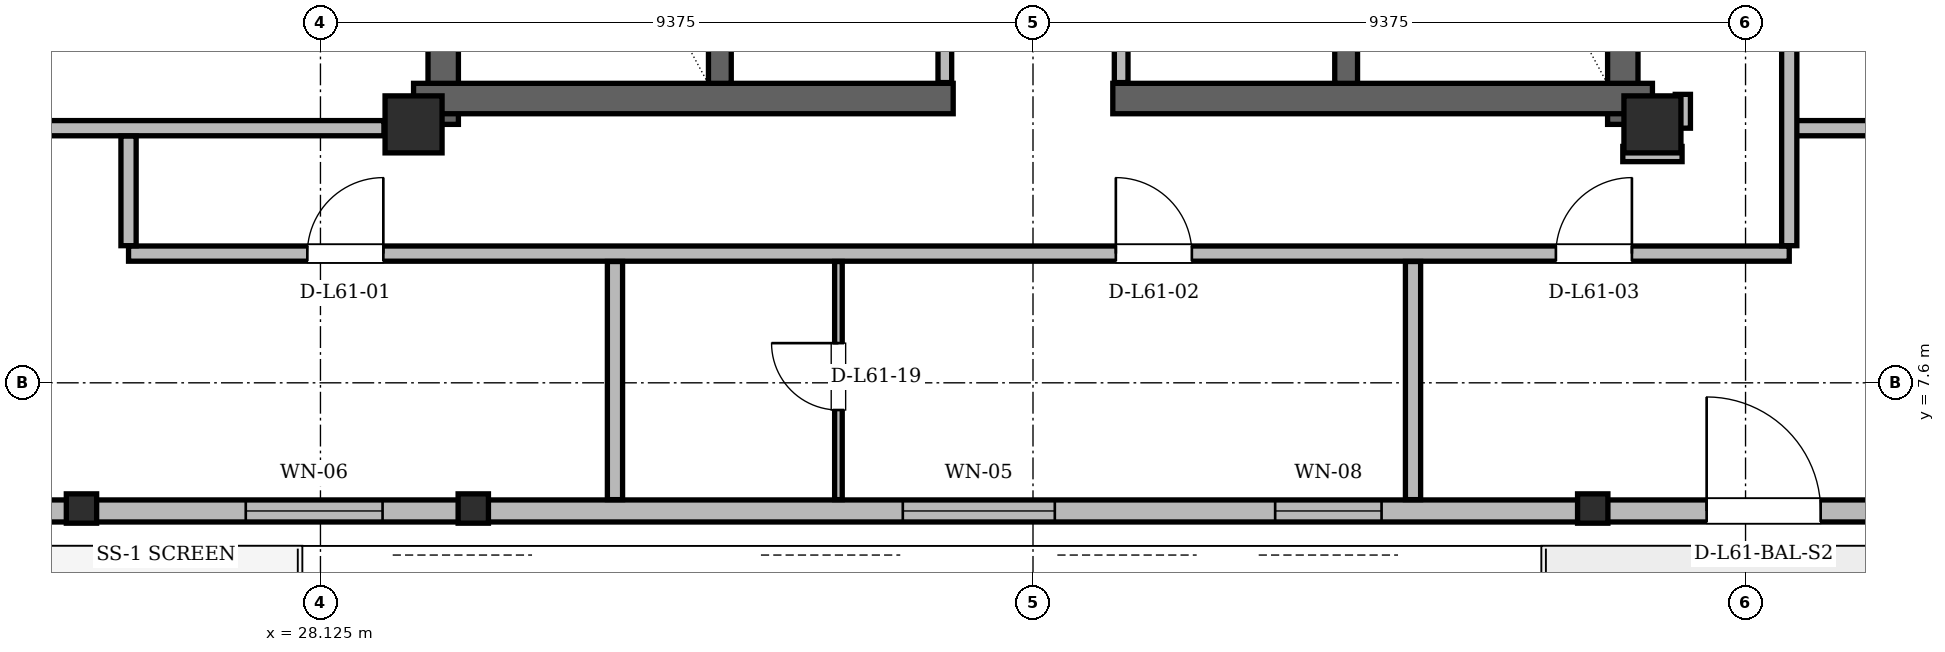
"""IFC4 building model, lengths in metres.
Left out: names, types, materials, properties, quantities, classifications, styles, units other than length and angle.
Written with IfcOpenShell. Run it as: python <this file> out.ifc"""

import sys

from ifc_helpers import new_model, si_unit, direction, frame, frame_2d, origin, origin_2d, place, context, subcontext, project, spatial, rectangle, hollow_rectangle, i_section, extrude, element, fill, save


model = new_model("IFC4")
c1 = context("Model", 3, precision=1e-05, world=origin(), true_north=direction((0.0, 1.0)))
c2 = subcontext(c1, "Body", "Model", "MODEL_VIEW")
j1 = project(units=[si_unit("LENGTHUNIT", "METRE"), si_unit("PLANEANGLEUNIT", "RADIAN")], contexts=[c1])
p1 = place(None, origin())
s1 = spatial("IfcSite", under=j1, at=p1, CompositionType="ELEMENT")
p2 = place(p1, origin())
s2 = spatial("IfcBuilding", under=s1, at=p2, CompositionType="ELEMENT")
p3 = place(p2, frame((0.0, 0.0, 230.7)))
s3 = spatial("IfcBuildingStorey", under=s2, at=p3, CompositionType="ELEMENT", Elevation=230.7)
for number, where, z_axis, x_axis in (
    (1, (29.35, 11.0, 0.0), (0.0, 0.0, 1.0), (1.0, 0.0, 0.0)),
    (2, (45.65, 11.0, 0.0), (0.0, 0.0, 1.0), (1.0, 0.0, 0.0)),
):
    element("IfcColumn", number, at=place(p3, frame(where, z_axis=z_axis, x_axis=x_axis)), inside=s3, PredefinedType="COLUMN", context=c2, shape_type="SweptSolid", body=[
        extrude(hollow_rectangle(XDim=0.75, YDim=0.75, WallThickness=0.06, at=origin_2d()), origin(), (0.0, 0.0, 1.0), 3.6),
    ])
p4 = place(p3, frame((24.99, 5.914, 0.005), z_axis=(-0.004962424838, 0.017946303524, 0.999826637237), x_axis=(-0.963831076081, -0.266513896037, 0.0)))
e3 = element("IfcColumn", 3, at=p4, inside=s3, PredefinedType="COLUMN", context=c2, shape_type="SweptSolid", body=[
    extrude(i_section(OverallWidth=0.399, OverallDepth=0.386, WebThickness=0.021, FlangeThickness=0.033, at=origin_2d()), origin(), (0.0, 0.0, 1.0), 3.592),
])
for number, where, z_axis, x_axis in (
    (4, (30.141, 5.914, 0.005), (-0.003, 0.018, 1.0), (-0.986, -0.164, 0.0)),
    (5, (44.859, 5.914, 0.005), (0.003, 0.018, 1.0), (-0.986, 0.164, 0.0)),
):
    element("IfcColumn", number, at=place(p3, frame(where, z_axis=z_axis, x_axis=x_axis)), inside=s3, PredefinedType="COLUMN", context=c2, shape_type="SweptSolid", body=[
        extrude(i_section(OverallWidth=0.399, OverallDepth=0.386, WebThickness=0.021, FlangeThickness=0.033, at=origin_2d()), origin(), (0.0, 0.0, 1.0), 3.591),
    ])
for number, where, z_axis, x_axis in (
    (6, (29.74, 11.0, 0.0), (0.0, 0.0, 1.0), (0.0, 1.0, 0.0)),
    (7, (45.26, 11.0, 0.0), (0.0, 0.0, 1.0), (0.0, 1.0, 0.0)),
):
    element("IfcWall", number, at=place(p3, frame(where, z_axis=z_axis, x_axis=x_axis)), inside=s3, PredefinedType="SHEAR", context=c2, shape_type="SweptSolid", body=[
        extrude(rectangle(XDim=13.3, YDim=0.4, at=frame_2d((6.65, 0.0))), origin(), (0.0, 0.0, 1.0), 3.38),
    ])
for number, where, z_axis, x_axis in (
    (8, (29.35, 11.34, 0.0), (0.0, 0.0, 1.0), (1.0, 0.0, 0.0)),
    (9, (38.55, 11.34, 0.0), (0.0, 0.0, 1.0), (1.0, 0.0, 0.0)),
):
    element("IfcWall", number, at=place(p3, frame(where, z_axis=z_axis, x_axis=x_axis)), inside=s3, PredefinedType="SHEAR", context=c2, shape_type="SweptSolid", body=[
        extrude(rectangle(XDim=7.1, YDim=0.4, at=frame_2d((3.55, 0.0))), origin(), (0.0, 0.0, 1.0), 3.38),
    ])
for number, where, z_axis, x_axis in (
    (10, (33.38, 11.54, 0.0), (0.0, 0.0, 1.0), (0.0, 1.0, 0.0)),
    (11, (41.62, 11.54, 0.0), (0.0, 0.0, 1.0), (0.0, 1.0, 0.0)),
):
    element("IfcWall", number, at=place(p3, frame(where, z_axis=z_axis, x_axis=x_axis)), inside=s3, PredefinedType="SHEAR", context=c2, shape_type="SweptSolid", body=[
        extrude(rectangle(XDim=7.62, YDim=0.3, at=frame_2d((3.81, 0.0))), origin(), (0.0, 0.0, 1.0), 3.38),
    ])
p5 = place(p3, frame((19.102, 5.914, 0.0), z_axis=(0.0, 0.0, 1.0), x_axis=(1.0, 0.0, 0.0)))
e12 = element("IfcWall", 12, at=p5, inside=s3, PredefinedType="SOLIDWALL", context=c2, shape_type="SweptSolid", body=[
    extrude(rectangle(XDim=36.795, YDim=0.29, at=frame_2d((18.398, 0.0))), origin(), (0.0, 0.0, 1.0), 2.677),
])
p6 = place(p5, frame((3.639, 0.0, 0.0)))
e13 = element("IfcOpeningElement", 13, at=p6, cuts=e12, PredefinedType="OPENING", context=c2, shape_type="SweptSolid", body=[
    extrude(rectangle(XDim=1.5, YDim=2.2, at=frame_2d((0.75, 1.1))), frame((0.0, 0.145, 0.0), z_axis=(0.0, -1.0, 0.0), x_axis=(1.0, 0.0, 0.0)), (0.0, 0.0, 1.0), 0.29),
])
p7 = place(p5, frame((27.261, 0.0, 0.0)))
e14 = element("IfcOpeningElement", 14, at=p7, cuts=e12, PredefinedType="OPENING", context=c2, shape_type="SweptSolid", body=[
    extrude(rectangle(XDim=1.5, YDim=2.2, at=frame_2d((0.75, 1.1))), frame((0.0, 0.145, 0.0), z_axis=(0.0, -1.0, 0.0), x_axis=(1.0, 0.0, 0.0)), (0.0, 0.0, 1.0), 0.29),
])
p8 = place(p5, frame((8.04, 0.0, 0.85)))
e15 = element("IfcOpeningElement", 15, at=p8, cuts=e12, PredefinedType="OPENING", context=c2, shape_type="SweptSolid", body=[
    extrude(rectangle(XDim=1.8, YDim=1.717, at=frame_2d((0.9, 0.858))), frame((0.0, 0.145, 0.0), z_axis=(0.0, -1.0, 0.0), x_axis=(1.0, 0.0, 0.0)), (0.0, 0.0, 1.0), 0.29),
])
p9 = place(p5, frame((16.685, 0.0, 0.85)))
e16 = element("IfcOpeningElement", 16, at=p9, cuts=e12, PredefinedType="OPENING", context=c2, shape_type="SweptSolid", body=[
    extrude(rectangle(XDim=2.0, YDim=1.717, at=frame_2d((1.0, 0.858))), frame((0.0, 0.145, 0.0), z_axis=(0.0, -1.0, 0.0), x_axis=(1.0, 0.0, 0.0)), (0.0, 0.0, 1.0), 0.29),
])
p10 = place(p5, frame((21.584, 0.0, 0.85)))
e17 = element("IfcOpeningElement", 17, at=p10, cuts=e12, PredefinedType="OPENING", context=c2, shape_type="SweptSolid", body=[
    extrude(rectangle(XDim=1.4, YDim=1.6, at=frame_2d((0.7, 0.8))), frame((0.0, 0.145, 0.0), z_axis=(0.0, -1.0, 0.0), x_axis=(1.0, 0.0, 0.0)), (0.0, 0.0, 1.0), 0.29),
])
p11 = place(p5, frame((32.27, 0.0, 0.85)))
e18 = element("IfcOpeningElement", 18, at=p11, cuts=e12, PredefinedType="OPENING", context=c2, shape_type="SweptSolid", body=[
    extrude(rectangle(XDim=1.2, YDim=1.48, at=frame_2d((0.6, 0.74))), frame((0.0, 0.145, 0.0), z_axis=(0.0, -1.0, 0.0), x_axis=(1.0, 0.0, 0.0)), (0.0, 0.0, 1.0), 0.29),
])
p12 = place(p3, frame((58.984, 11.26, 0.0), z_axis=(0.0, 0.0, 1.0), x_axis=(-0.50000331183, 0.86602349169, 0.0)))
e19 = element("IfcWall", 19, at=p12, inside=s3, PredefinedType="SOLIDWALL", context=c2, shape_type="SweptSolid", body=[
    extrude(rectangle(XDim=36.795, YDim=0.29, at=frame_2d((18.397, 0.0))), origin(), (0.0, 0.0, 1.0), 2.677),
])
p13 = place(p12, frame((3.219, 0.0, 0.0)))
e20 = element("IfcOpeningElement", 20, at=p13, cuts=e19, PredefinedType="OPENING", context=c2, shape_type="SweptSolid", body=[
    extrude(rectangle(XDim=1.5, YDim=2.2, at=frame_2d((0.75, 1.1))), frame((0.0, 0.145, 0.0), z_axis=(0.0, -1.0, 0.0), x_axis=(1.0, 0.0, 0.0)), (0.0, 0.0, 1.0), 0.29),
])
p14 = place(p12, frame((27.151, 0.0, 0.0)))
e21 = element("IfcOpeningElement", 21, at=p14, cuts=e19, PredefinedType="OPENING", context=c2, shape_type="SweptSolid", body=[
    extrude(rectangle(XDim=1.3, YDim=2.2, at=frame_2d((0.65, 1.1))), frame((0.0, 0.145, 0.0), z_axis=(0.0, -1.0, 0.0), x_axis=(1.0, 0.0, 0.0)), (0.0, 0.0, 1.0), 0.29),
])
p15 = place(p12, frame((1.169, 0.0, 0.85)))
e22 = element("IfcOpeningElement", 22, at=p15, cuts=e19, PredefinedType="OPENING", context=c2, shape_type="SweptSolid", body=[
    extrude(rectangle(XDim=1.2, YDim=1.48, at=frame_2d((0.6, 0.74))), frame((0.0, 0.145, 0.0), z_axis=(0.0, -1.0, 0.0), x_axis=(1.0, 0.0, 0.0)), (0.0, 0.0, 1.0), 0.29),
])
p16 = place(p12, frame((7.888, 0.0, 0.85)))
e23 = element("IfcOpeningElement", 23, at=p16, cuts=e19, PredefinedType="OPENING", context=c2, shape_type="SweptSolid", body=[
    extrude(rectangle(XDim=1.2, YDim=1.48, at=frame_2d((0.6, 0.74))), frame((0.0, 0.145, 0.0), z_axis=(0.0, -1.0, 0.0), x_axis=(1.0, 0.0, 0.0)), (0.0, 0.0, 1.0), 0.29),
])
p17 = place(p12, frame((32.464, 0.0, 0.85)))
e24 = element("IfcOpeningElement", 24, at=p17, cuts=e19, PredefinedType="OPENING", context=c2, shape_type="SweptSolid", body=[
    extrude(rectangle(XDim=1.2, YDim=1.48, at=frame_2d((0.6, 0.74))), frame((0.0, 0.145, 0.0), z_axis=(0.0, -1.0, 0.0), x_axis=(1.0, 0.0, 0.0)), (0.0, 0.0, 1.0), 0.29),
])
p18 = place(p12, frame((16.904, 0.0, 0.85)))
e25 = element("IfcOpeningElement", 25, at=p18, cuts=e19, PredefinedType="OPENING", context=c2, shape_type="SweptSolid", body=[
    extrude(rectangle(XDim=2.0, YDim=1.717, at=frame_2d((1.0, 0.858))), frame((0.0, 0.145, 0.0), z_axis=(0.0, -1.0, 0.0), x_axis=(1.0, 0.0, 0.0)), (0.0, 0.0, 1.0), 0.29),
])
p19 = place(p12, frame((23.036, 0.0, 0.85)))
e26 = element("IfcOpeningElement", 26, at=p19, cuts=e19, PredefinedType="OPENING", context=c2, shape_type="SweptSolid", body=[
    extrude(rectangle(XDim=1.4, YDim=1.6, at=frame_2d((0.7, 0.8))), frame((0.0, 0.145, 0.0), z_axis=(0.0, -1.0, 0.0), x_axis=(1.0, 0.0, 0.0)), (0.0, 0.0, 1.0), 0.29),
])
p20 = place(p3, frame((34.414, 43.126, 0.0), z_axis=(0.0, 0.0, 1.0), x_axis=(-0.50000331183, -0.86602349169, 0.0)))
e27 = element("IfcWall", 27, at=p20, inside=s3, PredefinedType="SOLIDWALL", context=c2, shape_type="SweptSolid", body=[
    extrude(rectangle(XDim=36.795, YDim=0.29, at=frame_2d((18.397, 0.0))), origin(), (0.0, 0.0, 1.0), 2.677),
])
p21 = place(p20, frame((3.529, 0.0, 0.0)))
e28 = element("IfcOpeningElement", 28, at=p21, cuts=e27, PredefinedType="OPENING", context=c2, shape_type="SweptSolid", body=[
    extrude(rectangle(XDim=1.3, YDim=2.2, at=frame_2d((0.65, 1.1))), frame((0.0, 0.145, 0.0), z_axis=(0.0, -1.0, 0.0), x_axis=(1.0, 0.0, 0.0)), (0.0, 0.0, 1.0), 0.29),
])
p22 = place(p20, frame((27.261, 0.0, 0.0)))
e29 = element("IfcOpeningElement", 29, at=p22, cuts=e27, PredefinedType="OPENING", context=c2, shape_type="SweptSolid", body=[
    extrude(rectangle(XDim=1.5, YDim=2.2, at=frame_2d((0.75, 1.1))), frame((0.0, 0.145, 0.0), z_axis=(0.0, -1.0, 0.0), x_axis=(1.0, 0.0, 0.0)), (0.0, 0.0, 1.0), 0.29),
])
p23 = place(p20, frame((22.271, 0.0, 0.85)))
e30 = element("IfcOpeningElement", 30, at=p23, cuts=e27, PredefinedType="OPENING", context=c2, shape_type="SweptSolid", body=[
    extrude(rectangle(XDim=2.4, YDim=1.717, at=frame_2d((1.2, 0.858))), frame((0.0, 0.145, 0.0), z_axis=(0.0, -1.0, 0.0), x_axis=(1.0, 0.0, 0.0)), (0.0, 0.0, 1.0), 0.29),
])
p24 = place(p20, frame((33.406, 0.0, 0.85)))
e31 = element("IfcOpeningElement", 31, at=p24, cuts=e27, PredefinedType="OPENING", context=c2, shape_type="SweptSolid", body=[
    extrude(rectangle(XDim=2.2, YDim=1.717, at=frame_2d((1.1, 0.858))), frame((0.0, 0.145, 0.0), z_axis=(0.0, -1.0, 0.0), x_axis=(1.0, 0.0, 0.0)), (0.0, 0.0, 1.0), 0.29),
])
p25 = place(p20, frame((11.662, 0.0, 0.85)))
e32 = element("IfcOpeningElement", 32, at=p25, cuts=e27, PredefinedType="OPENING", context=c2, shape_type="SweptSolid", body=[
    extrude(rectangle(XDim=1.2, YDim=1.48, at=frame_2d((0.6, 0.74))), frame((0.0, 0.145, 0.0), z_axis=(0.0, -1.0, 0.0), x_axis=(1.0, 0.0, 0.0)), (0.0, 0.0, 1.0), 0.29),
])
p26 = place(p20, frame((16.295, 0.0, 0.85)))
e33 = element("IfcOpeningElement", 33, at=p26, cuts=e27, PredefinedType="OPENING", context=c2, shape_type="SweptSolid", body=[
    extrude(rectangle(XDim=1.8, YDim=1.717, at=frame_2d((0.9, 0.858))), frame((0.0, 0.145, 0.0), z_axis=(0.0, -1.0, 0.0), x_axis=(1.0, 0.0, 0.0)), (0.0, 0.0, 1.0), 0.29),
])
p27 = place(p3, frame((36.34, 11.55, 0.0), z_axis=(0.0, 0.0, 1.0), x_axis=(0.0, 1.0, 0.0)))
e34 = element("IfcWall", 34, at=p27, inside=s3, PredefinedType="PARTITIONING", context=c2, shape_type="SweptSolid", body=[
    extrude(rectangle(XDim=5.55, YDim=0.18, at=frame_2d((2.775, 0.0))), origin(), (0.0, 0.0, 1.0), 3.38),
])
p28 = place(p27, frame((2.85, 0.0, 0.0)))
e35 = element("IfcOpeningElement", 35, at=p28, cuts=e34, PredefinedType="OPENING", context=c2, shape_type="SweptSolid", body=[
    extrude(rectangle(XDim=0.95, YDim=2.1, at=frame_2d((0.475, 1.05))), frame((0.0, 0.09, 0.0), z_axis=(0.0, -1.0, 0.0), x_axis=(1.0, 0.0, 0.0)), (0.0, 0.0, 1.0), 0.18),
])
p29 = place(p3, frame((38.66, 11.55, 0.0), z_axis=(0.0, 0.0, 1.0), x_axis=(0.0, 1.0, 0.0)))
e36 = element("IfcWall", 36, at=p29, inside=s3, PredefinedType="PARTITIONING", context=c2, shape_type="SweptSolid", body=[
    extrude(rectangle(XDim=5.55, YDim=0.18, at=frame_2d((2.775, 0.0))), origin(), (0.0, 0.0, 1.0), 3.38),
])
p30 = place(p29, frame((2.0, 0.0, 0.0)))
e37 = element("IfcOpeningElement", 37, at=p30, cuts=e36, PredefinedType="OPENING", context=c2, shape_type="SweptSolid", body=[
    extrude(rectangle(XDim=0.95, YDim=2.1, at=frame_2d((0.475, 1.05))), frame((0.0, 0.09, 0.0), z_axis=(0.0, -1.0, 0.0), x_axis=(1.0, 0.0, 0.0)), (0.0, 0.0, 1.0), 0.18),
])
p31 = place(p3, frame((25.6, 9.3, 0.0), z_axis=(0.0, 0.0, 1.0), x_axis=(1.0, 0.0, 0.0)))
e38 = element("IfcWall", 38, at=p31, inside=s3, PredefinedType="PARTITIONING", context=c2, shape_type="SweptSolid", body=[
    extrude(rectangle(XDim=21.85, YDim=0.2, at=frame_2d((10.925, 0.0))), origin(), (0.0, 0.0, 1.0), 2.913),
])
p32 = place(p31, frame((2.352, 0.0, 0.0)))
e39 = element("IfcOpeningElement", 39, at=p32, cuts=e38, PredefinedType="OPENING", context=c2, shape_type="SweptSolid", body=[
    extrude(rectangle(XDim=1.0, YDim=2.18, at=frame_2d((0.5, 1.09))), frame((0.0, 0.1, 0.0), z_axis=(0.0, -1.0, 0.0), x_axis=(1.0, 0.0, 0.0)), (0.0, 0.0, 1.0), 0.2),
])
p33 = place(p31, frame((12.99, 0.0, 0.0)))
e40 = element("IfcOpeningElement", 40, at=p33, cuts=e38, PredefinedType="OPENING", context=c2, shape_type="SweptSolid", body=[
    extrude(rectangle(XDim=1.0, YDim=2.18, at=frame_2d((0.5, 1.09))), frame((0.0, 0.1, 0.0), z_axis=(0.0, -1.0, 0.0), x_axis=(1.0, 0.0, 0.0)), (0.0, 0.0, 1.0), 0.2),
])
p34 = place(p31, frame((18.78, 0.0, 0.0)))
e41 = element("IfcOpeningElement", 41, at=p34, cuts=e38, PredefinedType="OPENING", context=c2, shape_type="SweptSolid", body=[
    extrude(rectangle(XDim=1.0, YDim=2.18, at=frame_2d((0.5, 1.09))), frame((0.0, 0.1, 0.0), z_axis=(0.0, -1.0, 0.0), x_axis=(1.0, 0.0, 0.0)), (0.0, 0.0, 1.0), 0.2),
])
p35 = place(p3, frame((45.26, 10.61, 0.0), z_axis=(0.0, 0.0, 1.0), x_axis=(1.0, 0.0, 0.0)))
e42 = element("IfcWall", 42, at=p35, inside=s3, PredefinedType="PARTITIONING", context=c2, shape_type="SweptSolid", body=[
    extrude(rectangle(XDim=0.78, YDim=0.2, at=frame_2d((0.39, 0.0))), origin(), (0.0, 0.0, 1.0), 3.38),
])
p36 = place(p3, frame((16.402, 10.95, 0.0), z_axis=(0.0, 0.0, 1.0), x_axis=(1.0, 0.0, 0.0)))
e43 = element("IfcWall", 43, at=p36, inside=s3, PredefinedType="PARTITIONING", context=c2, shape_type="SweptSolid", body=[
    extrude(rectangle(XDim=12.558, YDim=0.2, at=frame_2d((6.279, 0.0))), origin(), (0.0, 0.0, 1.0), 2.913),
])
p37 = place(p3, frame((47.45, 10.95, 0.0), z_axis=(0.0, 0.0, 1.0), x_axis=(1.0, 0.0, 0.0)))
e44 = element("IfcWall", 44, at=p37, inside=s3, PredefinedType="PARTITIONING", context=c2, shape_type="SweptSolid", body=[
    extrude(rectangle(XDim=11.148, YDim=0.2, at=frame_2d((5.574, 0.0))), origin(), (0.0, 0.0, 1.0), 2.913),
])
p38 = place(p3, frame((25.6, 9.404, 0.0), z_axis=(0.0, 0.0, 1.0), x_axis=(0.0, 1.0, 0.0)))
e45 = element("IfcWall", 45, at=p38, inside=s3, PredefinedType="PARTITIONING", context=c2, shape_type="SweptSolid", body=[
    extrude(rectangle(XDim=1.442, YDim=0.2, at=frame_2d((0.721, 0.0))), origin(), (0.0, 0.0, 1.0), 3.38),
])
p39 = place(p3, frame((32.0, 6.063, 0.0), z_axis=(0.0, 0.0, 1.0), x_axis=(0.0, 1.0, 0.0)))
e46 = element("IfcWall", 46, at=p39, inside=s3, PredefinedType="PARTITIONING", context=c2, shape_type="SweptSolid", body=[
    extrude(rectangle(XDim=3.133, YDim=0.2, at=frame_2d((1.566, 0.0))), origin(), (0.0, 0.0, 1.0), 2.966),
])
p40 = place(p3, frame((34.94, 6.063, 0.0), z_axis=(0.0, 0.0, 1.0), x_axis=(0.0, 1.0, 0.0)))
e47 = element("IfcWall", 47, at=p40, inside=s3, PredefinedType="PARTITIONING", context=c2, shape_type="SweptSolid", body=[
    extrude(rectangle(XDim=3.133, YDim=0.1, at=frame_2d((1.566, 0.0))), origin(), (0.0, 0.0, 1.0), 3.38),
])
p41 = place(p40, frame((1.179, 0.0, 0.0)))
e48 = element("IfcOpeningElement", 48, at=p41, cuts=e47, PredefinedType="OPENING", context=c2, shape_type="SweptSolid", body=[
    extrude(rectangle(XDim=0.88, YDim=2.08, at=frame_2d((0.44, 1.04))), frame((0.0, 0.05, 0.0), z_axis=(0.0, -1.0, 0.0), x_axis=(1.0, 0.0, 0.0)), (0.0, 0.0, 1.0), 0.1),
])
p42 = place(p3, frame((42.5, 6.063, 0.0), z_axis=(0.0, 0.0, 1.0), x_axis=(0.0, 1.0, 0.0)))
e49 = element("IfcWall", 49, at=p42, inside=s3, PredefinedType="PARTITIONING", context=c2, shape_type="SweptSolid", body=[
    extrude(rectangle(XDim=3.133, YDim=0.2, at=frame_2d((1.566, 0.0))), origin(), (0.0, 0.0, 1.0), 3.38),
])
p43 = place(p3, frame((46.05, 10.95, 0.0), z_axis=(0.0, 0.0, 1.0), x_axis=(0.0, 1.0, 0.0)))
e50 = element("IfcWall", 50, at=p43, inside=s3, PredefinedType="PARTITIONING", context=c2, shape_type="SweptSolid", body=[
    extrude(rectangle(XDim=0.445, YDim=0.2, at=frame_2d((0.223, 0.0))), origin(), (0.0, 0.0, 1.0), 2.913),
])
p44 = place(p3, frame((47.45, 9.404, 0.0), z_axis=(0.0, 0.0, 1.0), x_axis=(0.0, 1.0, 0.0)))
e51 = element("IfcWall", 51, at=p44, inside=s3, PredefinedType="PARTITIONING", context=c2, shape_type="SweptSolid", body=[
    extrude(rectangle(XDim=16.462, YDim=0.2, at=frame_2d((8.231, 0.0))), origin(), (0.0, 0.0, 1.0), 2.913),
])
p45 = place(p44, frame((3.163, 0.0, 0.0)))
e52 = element("IfcOpeningElement", 52, at=p45, cuts=e51, PredefinedType="OPENING", context=c2, shape_type="SweptSolid", body=[
    extrude(rectangle(XDim=1.0, YDim=2.18, at=frame_2d((0.5, 1.09))), frame((0.0, 0.1, 0.0), z_axis=(0.0, -1.0, 0.0), x_axis=(1.0, 0.0, 0.0)), (0.0, 0.0, 1.0), 0.2),
])
p46 = place(p44, frame((9.778, 0.0, 0.0)))
e53 = element("IfcOpeningElement", 53, at=p46, cuts=e51, PredefinedType="OPENING", context=c2, shape_type="SweptSolid", body=[
    extrude(rectangle(XDim=1.0, YDim=2.18, at=frame_2d((0.5, 1.09))), frame((0.0, 0.1, 0.0), z_axis=(0.0, -1.0, 0.0), x_axis=(1.0, 0.0, 0.0)), (0.0, 0.0, 1.0), 0.2),
])
p47 = place(p7, origin())
e54 = element("IfcDoor", 54, at=p47, inside=s3, OperationType="SINGLE_SWING_LEFT", PredefinedType="DOOR", context=c2, shape_type="SweptSolid", body=[
    extrude(rectangle(XDim=1.5, YDim=2.2, at=frame_2d((0.75, 1.1))), frame((0.0, 0.025, 0.0), z_axis=(0.0, -1.0, 0.0), x_axis=(1.0, 0.0, 0.0)), (0.0, 0.0, 1.0), 0.05),
])
fill(e14, e54)
p48 = place(p8, origin())
e55 = element("IfcWindow", 55, at=p48, inside=s3, PartitioningType="SINGLE_PANEL", PredefinedType="WINDOW", context=c2, shape_type="SweptSolid", body=[
    extrude(rectangle(XDim=1.8, YDim=1.717, at=frame_2d((0.9, 0.858))), frame((0.0, 0.03, 0.0), z_axis=(0.0, -1.0, 0.0), x_axis=(1.0, 0.0, 0.0)), (0.0, 0.0, 1.0), 0.06),
])
fill(e15, e55)
p49 = place(p9, origin())
e56 = element("IfcWindow", 56, at=p49, inside=s3, PartitioningType="SINGLE_PANEL", PredefinedType="WINDOW", context=c2, shape_type="SweptSolid", body=[
    extrude(rectangle(XDim=2.0, YDim=1.717, at=frame_2d((1.0, 0.858))), frame((0.0, 0.03, 0.0), z_axis=(0.0, -1.0, 0.0), x_axis=(1.0, 0.0, 0.0)), (0.0, 0.0, 1.0), 0.06),
])
fill(e16, e56)
p50 = place(p10, origin())
e57 = element("IfcWindow", 57, at=p50, inside=s3, PartitioningType="SINGLE_PANEL", PredefinedType="WINDOW", context=c2, shape_type="SweptSolid", body=[
    extrude(rectangle(XDim=1.4, YDim=1.6, at=frame_2d((0.7, 0.8))), frame((0.0, 0.03, 0.0), z_axis=(0.0, -1.0, 0.0), x_axis=(1.0, 0.0, 0.0)), (0.0, 0.0, 1.0), 0.06),
])
fill(e17, e57)
p51 = place(p32, origin())
e58 = element("IfcDoor", 58, at=p51, inside=s3, OperationType="SINGLE_SWING_RIGHT", PredefinedType="DOOR", context=c2, shape_type="SweptSolid", body=[
    extrude(rectangle(XDim=1.0, YDim=2.18, at=frame_2d((0.5, 1.09))), frame((0.0, 0.025, 0.0), z_axis=(0.0, -1.0, 0.0), x_axis=(1.0, 0.0, 0.0)), (0.0, 0.0, 1.0), 0.05),
])
fill(e39, e58)
p52 = place(p33, origin())
e59 = element("IfcDoor", 59, at=p52, inside=s3, OperationType="SINGLE_SWING_LEFT", PredefinedType="DOOR", context=c2, shape_type="SweptSolid", body=[
    extrude(rectangle(XDim=1.0, YDim=2.18, at=frame_2d((0.5, 1.09))), frame((0.0, 0.025, 0.0), z_axis=(0.0, -1.0, 0.0), x_axis=(1.0, 0.0, 0.0)), (0.0, 0.0, 1.0), 0.05),
])
fill(e40, e59)
p53 = place(p34, origin())
e60 = element("IfcDoor", 60, at=p53, inside=s3, OperationType="SINGLE_SWING_RIGHT", PredefinedType="DOOR", context=c2, shape_type="SweptSolid", body=[
    extrude(rectangle(XDim=1.0, YDim=2.18, at=frame_2d((0.5, 1.09))), frame((0.0, 0.025, 0.0), z_axis=(0.0, -1.0, 0.0), x_axis=(1.0, 0.0, 0.0)), (0.0, 0.0, 1.0), 0.05),
])
fill(e41, e60)
p54 = place(p41, origin())
e61 = element("IfcDoor", 61, at=p54, inside=s3, OperationType="SINGLE_SWING_RIGHT", PredefinedType="DOOR", context=c2, shape_type="SweptSolid", body=[
    extrude(rectangle(XDim=0.88, YDim=2.08, at=frame_2d((0.44, 1.04))), frame((0.0, 0.025, 0.0), z_axis=(0.0, -1.0, 0.0), x_axis=(1.0, 0.0, 0.0)), (0.0, 0.0, 1.0), 0.05),
])
fill(e48, e61)
save(model, sys.argv[1])
